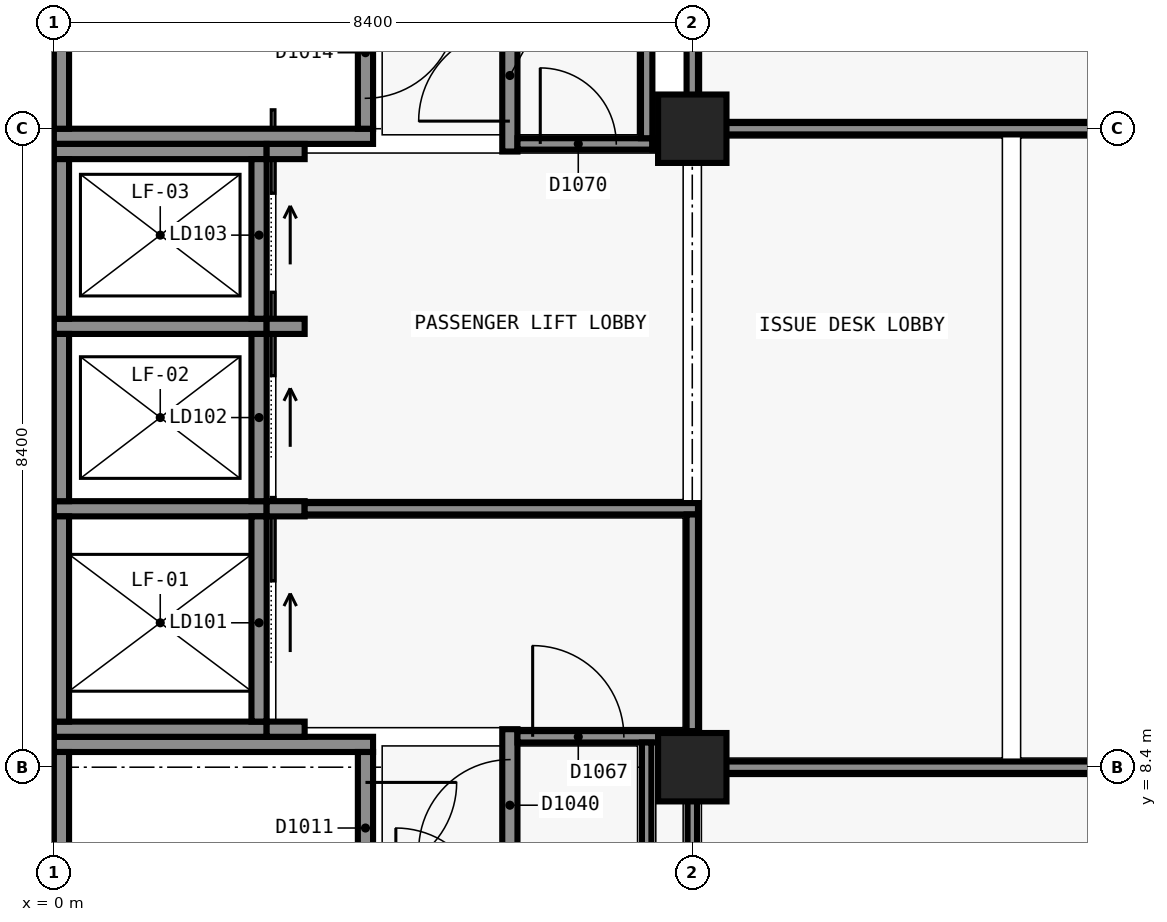
"""IFC4 building model, lengths in metres.
Left out: names, types, materials, properties, quantities, classifications, styles, units other than length and angle.
Written with IfcOpenShell. Run it as: python <this file> out.ifc"""

import sys

from ifc_helpers import new_model, si_unit, direction, frame, frame_2d, origin, origin_2d, place, context, subcontext, project, spatial, rectangle, extrude, element, fill, save


model = new_model("IFC4")
c1 = context("Model", 3, precision=1e-05, world=origin(), true_north=direction((0.0, 1.0)))
c2 = subcontext(c1, "Body", "Model", "MODEL_VIEW")
j1 = project(units=[si_unit("LENGTHUNIT", "METRE"), si_unit("PLANEANGLEUNIT", "RADIAN")], contexts=[c1])
p1 = place(None, origin())
s1 = spatial("IfcSite", under=j1, at=p1, CompositionType="ELEMENT")
p2 = place(p1, origin())
s2 = spatial("IfcBuilding", under=s1, at=p2, CompositionType="ELEMENT")
p3 = place(p2, frame((0.0, 0.0, 5.4)))
s3 = spatial("IfcBuildingStorey", under=s2, at=p3, CompositionType="ELEMENT", Elevation=5.4)
p4 = place(p3, frame((0.0, 8.7, 0.0), z_axis=(0.0, 0.0, 1.0), x_axis=(1.0, 0.0, 0.0)))
e1 = element("IfcWall", 1, at=p4, inside=s3, PredefinedType="SHEAR", context=c2, shape_type="SweptSolid", body=[
    extrude(rectangle(XDim=4.199, YDim=0.2, at=frame_2d((2.1, 0.0))), origin(), (0.0, 0.0, 1.0), 4.8),
])
p5 = place(p3, frame((0.1, 0.2, 0.0), z_axis=(0.0, 0.0, 1.0), x_axis=(0.0, 1.0, 0.0)))
e2 = element("IfcWall", 2, at=p5, inside=s3, PredefinedType="SHEAR", context=c2, shape_type="SweptSolid", body=[
    extrude(rectangle(XDim=8.4, YDim=0.2, at=frame_2d((4.2, 0.0))), origin(), (0.0, 0.0, 1.0), 4.8),
])
p6 = place(p3, frame((4.1, 8.6, 0.0), z_axis=(0.0, 0.0, 1.0), x_axis=(0.0, -1.0, 0.0)))
e3 = element("IfcWall", 3, at=p6, inside=s3, PredefinedType="SHEAR", context=c2, shape_type="SweptSolid", body=[
    extrude(rectangle(XDim=8.4, YDim=0.2, at=frame_2d((4.2, 0.0))), origin(), (0.0, 0.0, 1.0), 4.8),
])
p7 = place(p6, frame((0.4, 0.0, 0.0)))
e4 = element("IfcOpeningElement", 4, at=p7, cuts=e3, PredefinedType="OPENING", context=c2, shape_type="SweptSolid", body=[
    extrude(rectangle(XDim=1.2, YDim=2.1, at=frame_2d((0.6, 1.05))), frame((0.0, 0.11, 0.0), z_axis=(0.0, -1.0, 0.0), x_axis=(1.0, 0.0, 0.0)), (0.0, 0.0, 1.0), 0.22),
])
p8 = place(p3, frame((4.2, 16.7, 0.0), z_axis=(0.0, 0.0, 1.0), x_axis=(-1.0, 0.0, 0.0)))
e5 = element("IfcWall", 5, at=p8, inside=s3, PredefinedType="SHEAR", context=c2, shape_type="SweptSolid", body=[
    extrude(rectangle(XDim=4.199, YDim=0.2, at=frame_2d((2.1, 0.0))), origin(), (0.0, 0.0, 1.0), 4.8),
])
p9 = place(p3, frame((0.1, 16.8, 0.0), z_axis=(0.0, 0.0, 1.0), x_axis=(0.0, 1.0, 0.0)))
e6 = element("IfcWall", 6, at=p9, inside=s3, PredefinedType="SHEAR", context=c2, shape_type="SweptSolid", body=[
    extrude(rectangle(XDim=8.2, YDim=0.2, at=frame_2d((4.1, 0.0))), origin(), (0.0, 0.0, 1.0), 4.8),
])
p10 = place(p3, frame((4.1, 25.0, 0.0), z_axis=(0.0, 0.0, 1.0), x_axis=(0.0, -1.0, 0.0)))
e7 = element("IfcWall", 7, at=p10, inside=s3, PredefinedType="SHEAR", context=c2, shape_type="SweptSolid", body=[
    extrude(rectangle(XDim=8.2, YDim=0.2, at=frame_2d((4.1, 0.0))), origin(), (0.0, 0.0, 1.0), 4.8),
])
p11 = place(p10, frame((6.6, 0.0, 0.0)))
e8 = element("IfcOpeningElement", 8, at=p11, cuts=e7, PredefinedType="OPENING", context=c2, shape_type="SweptSolid", body=[
    extrude(rectangle(XDim=1.2, YDim=2.1, at=frame_2d((0.6, 1.05))), frame((0.0, 0.11, 0.0), z_axis=(0.0, -1.0, 0.0), x_axis=(1.0, 0.0, 0.0)), (0.0, 0.0, 1.0), 0.22),
])
for number, where, z_axis, x_axis in (
    (9, (2.8, 8.9, 0.0), (0.0, 0.0, 1.0), (-1.0, 0.0, 0.0)),
    (10, (0.0, 11.8, 0.0), (0.0, 0.0, 1.0), (1.0, 0.0, 0.0)),
):
    element("IfcWall", number, at=place(p3, frame(where, z_axis=z_axis, x_axis=x_axis)), inside=s3, PredefinedType="SHEAR", context=c2, shape_type="SweptSolid", body=[
        extrude(rectangle(XDim=2.8, YDim=0.2, at=frame_2d((1.4, 0.0))), origin(), (0.0, 0.0, 1.0), 4.8),
    ])
p12 = place(p3, frame((0.1, 9.0, 0.0), z_axis=(0.0, 0.0, 1.0), x_axis=(0.0, 1.0, 0.0)))
e11 = element("IfcWall", 11, at=p12, inside=s3, PredefinedType="SHEAR", context=c2, shape_type="SweptSolid", body=[
    extrude(rectangle(XDim=2.7, YDim=0.2, at=frame_2d((1.35, 0.0))), origin(), (0.0, 0.0, 1.0), 4.8),
])
p13 = place(p3, frame((2.7, 11.7, 0.0), z_axis=(0.0, 0.0, 1.0), x_axis=(0.0, -1.0, 0.0)))
e12 = element("IfcWall", 12, at=p13, inside=s3, PredefinedType="SHEAR", context=c2, shape_type="SweptSolid", body=[
    extrude(rectangle(XDim=2.7, YDim=0.2, at=frame_2d((1.35, 0.0))), origin(), (0.0, 0.0, 1.0), 4.8),
])
p14 = place(p13, frame((0.85, 0.0, 0.0)))
e13 = element("IfcOpeningElement", 13, at=p14, cuts=e12, PredefinedType="OPENING", context=c2, shape_type="SweptSolid", body=[
    extrude(rectangle(XDim=1.1, YDim=2.1, at=frame_2d((0.55, 1.05))), frame((0.0, 0.11, 0.0), z_axis=(0.0, -1.0, 0.0), x_axis=(1.0, 0.0, 0.0)), (0.0, 0.0, 1.0), 0.22),
])
p15 = place(p3, frame((0.0, 14.2, 0.0), z_axis=(0.0, 0.0, 1.0), x_axis=(1.0, 0.0, 0.0)))
e14 = element("IfcWall", 14, at=p15, inside=s3, PredefinedType="SHEAR", context=c2, shape_type="SweptSolid", body=[
    extrude(rectangle(XDim=2.8, YDim=0.2, at=frame_2d((1.4, 0.0))), origin(), (0.0, 0.0, 1.0), 4.8),
])
p16 = place(p3, frame((0.1, 11.9, 0.0), z_axis=(0.0, 0.0, 1.0), x_axis=(0.0, 1.0, 0.0)))
e15 = element("IfcWall", 15, at=p16, inside=s3, PredefinedType="SHEAR", context=c2, shape_type="SweptSolid", body=[
    extrude(rectangle(XDim=2.2, YDim=0.2, at=frame_2d((1.1, 0.0))), origin(), (0.0, 0.0, 1.0), 4.8),
])
p17 = place(p3, frame((2.7, 14.1, 0.0), z_axis=(0.0, 0.0, 1.0), x_axis=(0.0, -1.0, 0.0)))
e16 = element("IfcWall", 16, at=p17, inside=s3, PredefinedType="SHEAR", context=c2, shape_type="SweptSolid", body=[
    extrude(rectangle(XDim=2.2, YDim=0.2, at=frame_2d((1.1, 0.0))), origin(), (0.0, 0.0, 1.0), 4.8),
])
p18 = place(p17, frame((0.55, 0.0, 0.0)))
e17 = element("IfcOpeningElement", 17, at=p18, cuts=e16, PredefinedType="OPENING", context=c2, shape_type="SweptSolid", body=[
    extrude(rectangle(XDim=1.1, YDim=2.1, at=frame_2d((0.55, 1.05))), frame((0.0, 0.11, 0.0), z_axis=(0.0, -1.0, 0.0), x_axis=(1.0, 0.0, 0.0)), (0.0, 0.0, 1.0), 0.22),
])
p19 = place(p3, frame((0.0, 16.5, 0.0), z_axis=(0.0, 0.0, 1.0), x_axis=(1.0, 0.0, 0.0)))
e18 = element("IfcWall", 18, at=p19, inside=s3, PredefinedType="SHEAR", context=c2, shape_type="SweptSolid", body=[
    extrude(rectangle(XDim=2.8, YDim=0.2, at=frame_2d((1.4, 0.0))), origin(), (0.0, 0.0, 1.0), 4.8),
])
p20 = place(p3, frame((0.1, 14.3, 0.0), z_axis=(0.0, 0.0, 1.0), x_axis=(0.0, 1.0, 0.0)))
e19 = element("IfcWall", 19, at=p20, inside=s3, PredefinedType="SHEAR", context=c2, shape_type="SweptSolid", body=[
    extrude(rectangle(XDim=2.1, YDim=0.2, at=frame_2d((1.05, 0.0))), origin(), (0.0, 0.0, 1.0), 4.8),
])
p21 = place(p3, frame((2.7, 16.4, 0.0), z_axis=(0.0, 0.0, 1.0), x_axis=(0.0, -1.0, 0.0)))
e20 = element("IfcWall", 20, at=p21, inside=s3, PredefinedType="SHEAR", context=c2, shape_type="SweptSolid", body=[
    extrude(rectangle(XDim=2.1, YDim=0.2, at=frame_2d((1.05, 0.0))), origin(), (0.0, 0.0, 1.0), 4.8),
])
p22 = place(p21, frame((0.45, 0.0, 0.0)))
e21 = element("IfcOpeningElement", 21, at=p22, cuts=e20, PredefinedType="OPENING", context=c2, shape_type="SweptSolid", body=[
    extrude(rectangle(XDim=1.1, YDim=2.1, at=frame_2d((0.55, 1.05))), frame((0.0, 0.11, 0.0), z_axis=(0.0, -1.0, 0.0), x_axis=(1.0, 0.0, 0.0)), (0.0, 0.0, 1.0), 0.22),
])
for number, where, z_axis, x_axis in (
    (22, (8.4, 8.4, 0.0), (0.0, 0.0, 1.0), (1.0, 0.0, 0.0)),
    (23, (8.4, 16.8, 0.0), (0.0, 0.0, 1.0), (1.0, 0.0, 0.0)),
):
    element("IfcColumn", number, at=place(p3, frame(where, z_axis=z_axis, x_axis=x_axis)), inside=s3, PredefinedType="COLUMN", context=c2, shape_type="SweptSolid", body=[
        extrude(rectangle(XDim=0.9, YDim=0.9, at=origin_2d()), origin(), (0.0, 0.0, 1.0), 4.8),
    ])
for number, where, z_axis, x_axis in (
    (24, (3.3, 8.9, 0.0), (0.0, 0.0, 1.0), (-1.0, 0.0, 0.0)),
    (25, (2.8, 11.8, 0.0), (0.0, 0.0, 1.0), (1.0, 0.0, 0.0)),
    (26, (2.8, 14.2, 0.0), (0.0, 0.0, 1.0), (1.0, 0.0, 0.0)),
    (27, (2.8, 16.5, 0.0), (0.0, 0.0, 1.0), (1.0, 0.0, 0.0)),
):
    element("IfcWall", number, at=place(p3, frame(where, z_axis=z_axis, x_axis=x_axis)), inside=s3, PredefinedType="SHEAR", context=c2, shape_type="SweptSolid", body=[
        extrude(rectangle(XDim=0.5, YDim=0.2, at=frame_2d((0.25, 0.0))), origin(), (0.0, 0.0, 1.0), 4.8),
    ])
p23 = place(p3, frame((6.0, 6.5, 0.0), z_axis=(0.0, 0.0, 1.0), x_axis=(0.0, 1.0, 0.0)))
e28 = element("IfcWall", 28, at=p23, inside=s3, PredefinedType="SOLIDWALL", context=c2, shape_type="SweptSolid", body=[
    extrude(rectangle(XDim=2.4, YDim=0.2, at=frame_2d((1.2, 0.0))), origin(), (0.0, 0.0, 1.0), 4.0),
])
p24 = place(p23, frame((0.8, 0.0, 0.0)))
e29 = element("IfcOpeningElement", 29, at=p24, cuts=e28, PredefinedType="OPENING", context=c2, shape_type="SweptSolid", body=[
    extrude(rectangle(XDim=1.2, YDim=2.1, at=frame_2d((0.6, 1.05))), frame((0.0, 0.11, 0.0), z_axis=(0.0, -1.0, 0.0), x_axis=(1.0, 0.0, 0.0)), (0.0, 0.0, 1.0), 0.22),
])
p25 = place(p3, frame((6.0, 16.5, 0.0), z_axis=(0.0, 0.0, 1.0), x_axis=(0.0, 1.0, 0.0)))
e30 = element("IfcWall", 30, at=p25, inside=s3, PredefinedType="SOLIDWALL", context=c2, shape_type="SweptSolid", body=[
    extrude(rectangle(XDim=2.4, YDim=0.2, at=frame_2d((1.2, 0.0))), origin(), (0.0, 0.0, 1.0), 4.0),
])
p26 = place(p25, frame((0.4, 0.0, 0.0)))
e31 = element("IfcOpeningElement", 31, at=p26, cuts=e30, PredefinedType="OPENING", context=c2, shape_type="SweptSolid", body=[
    extrude(rectangle(XDim=1.2, YDim=2.1, at=frame_2d((0.6, 1.05))), frame((0.0, 0.11, 0.0), z_axis=(0.0, -1.0, 0.0), x_axis=(1.0, 0.0, 0.0)), (0.0, 0.0, 1.0), 0.22),
])
p27 = place(p3, frame((8.325, 8.4, 0.0), z_axis=(0.0, 0.0, 1.0), x_axis=(1.0, 0.0, 0.0)))
e32 = element("IfcWall", 32, at=p27, inside=s3, PredefinedType="PARTITIONING", context=c2, shape_type="SweptSolid", body=[
    extrude(rectangle(XDim=19.175, YDim=0.15, at=frame_2d((9.587, 0.0))), origin(), (0.0, 0.0, 1.0), 3.8),
])
p28 = place(p3, frame((6.1, 16.6, 0.0), z_axis=(0.0, 0.0, 1.0), x_axis=(1.0, 0.0, 0.0)))
e33 = element("IfcWall", 33, at=p28, inside=s3, PredefinedType="PARTITIONING", context=c2, shape_type="SweptSolid", body=[
    extrude(rectangle(XDim=1.775, YDim=0.15, at=frame_2d((0.887, 0.0))), origin(), (0.0, 0.0, 1.0), 4.0),
])
p29 = place(p28, frame((0.3, 0.0, 0.0)))
e34 = element("IfcOpeningElement", 34, at=p29, cuts=e33, PredefinedType="OPENING", context=c2, shape_type="SweptSolid", body=[
    extrude(rectangle(XDim=1.0, YDim=2.1, at=frame_2d((0.5, 1.05))), frame((0.0, 0.085, 0.0), z_axis=(0.0, -1.0, 0.0), x_axis=(1.0, 0.0, 0.0)), (0.0, 0.0, 1.0), 0.17),
])
p30 = place(p3, frame((8.325, 16.8, 0.0), z_axis=(0.0, 0.0, 1.0), x_axis=(1.0, 0.0, 0.0)))
e35 = element("IfcWall", 35, at=p30, inside=s3, PredefinedType="PARTITIONING", context=c2, shape_type="SweptSolid", body=[
    extrude(rectangle(XDim=25.15, YDim=0.15, at=frame_2d((12.575, 0.0))), origin(), (0.0, 0.0, 1.0), 3.8),
])
p31 = place(p30, frame((20.575, 0.0, 0.0)))
e36 = element("IfcOpeningElement", 36, at=p31, cuts=e35, PredefinedType="OPENING", context=c2, shape_type="SweptSolid", body=[
    extrude(rectangle(XDim=1.0, YDim=2.1, at=frame_2d((0.5, 1.05))), frame((0.0, 0.085, 0.0), z_axis=(0.0, -1.0, 0.0), x_axis=(1.0, 0.0, 0.0)), (0.0, 0.0, 1.0), 0.17),
])
p32 = place(p30, frame((5.875, 0.0, 0.0)))
e37 = element("IfcOpeningElement", 37, at=p32, cuts=e35, PredefinedType="OPENING", context=c2, shape_type="SweptSolid", body=[
    extrude(rectangle(XDim=1.0, YDim=2.1, at=frame_2d((0.5, 1.05))), frame((0.0, 0.085, 0.0), z_axis=(0.0, -1.0, 0.0), x_axis=(1.0, 0.0, 0.0)), (0.0, 0.0, 1.0), 0.17),
])
p33 = place(p30, frame((12.175, 0.0, 0.0)))
e38 = element("IfcOpeningElement", 38, at=p33, cuts=e35, PredefinedType="OPENING", context=c2, shape_type="SweptSolid", body=[
    extrude(rectangle(XDim=1.0, YDim=2.1, at=frame_2d((0.5, 1.05))), frame((0.0, 0.085, 0.0), z_axis=(0.0, -1.0, 0.0), x_axis=(1.0, 0.0, 0.0)), (0.0, 0.0, 1.0), 0.17),
])
p34 = place(p3, frame((6.1, 8.8, 0.0), z_axis=(0.0, 0.0, 1.0), x_axis=(1.0, 0.0, 0.0)))
e39 = element("IfcWall", 39, at=p34, inside=s3, PredefinedType="SOLIDWALL", context=c2, shape_type="SweptSolid", body=[
    extrude(rectangle(XDim=2.375, YDim=0.15, at=frame_2d((1.188, 0.0))), origin(), (0.0, 0.0, 1.0), 3.8),
])
p35 = place(p34, frame((0.2, 0.0, 0.0)))
e40 = element("IfcOpeningElement", 40, at=p35, cuts=e39, PredefinedType="OPENING", context=c2, shape_type="SweptSolid", body=[
    extrude(rectangle(XDim=1.2, YDim=2.1, at=frame_2d((0.6, 1.05))), frame((0.0, 0.085, 0.0), z_axis=(0.0, -1.0, 0.0), x_axis=(1.0, 0.0, 0.0)), (0.0, 0.0, 1.0), 0.17),
])
p36 = place(p3, frame((3.3, 11.8, 0.0), z_axis=(0.0, 0.0, 1.0), x_axis=(1.0, 0.0, 0.0)))
e41 = element("IfcWall", 41, at=p36, inside=s3, PredefinedType="SOLIDWALL", context=c2, shape_type="SweptSolid", body=[
    extrude(rectangle(XDim=5.175, YDim=0.15, at=frame_2d((2.587, 0.0))), origin(), (0.0, 0.0, 1.0), 3.8),
])
p37 = place(p3, frame((7.875, 16.6, 0.0), z_axis=(0.0, 0.0, 1.0), x_axis=(1.0, 0.0, 0.0)))
e42 = element("IfcWall", 42, at=p37, inside=s3, PredefinedType="SOLIDWALL", context=c2, shape_type="SweptSolid", body=[
    extrude(rectangle(XDim=0.6, YDim=0.15, at=frame_2d((0.3, 0.0))), origin(), (0.0, 0.0, 1.0), 3.8),
])
p38 = place(p3, frame((8.4, 8.475, 0.0), z_axis=(0.0, 0.0, 1.0), x_axis=(0.0, 1.0, 0.0)))
e43 = element("IfcWall", 43, at=p38, inside=s3, PredefinedType="PARTITIONING", context=c2, shape_type="SweptSolid", body=[
    extrude(rectangle(XDim=0.25, YDim=0.15, at=frame_2d((0.125, 0.0))), origin(), (0.0, 0.0, 1.0), 3.8),
])
p39 = place(p3, frame((8.4, 8.875, 0.0), z_axis=(0.0, 0.0, 1.0), x_axis=(0.0, 1.0, 0.0)))
e44 = element("IfcWall", 44, at=p39, inside=s3, PredefinedType="SOLIDWALL", context=c2, shape_type="SweptSolid", body=[
    extrude(rectangle(XDim=2.85, YDim=0.15, at=frame_2d((1.425, 0.0))), origin(), (0.0, 0.0, 1.0), 3.8),
])
p40 = place(p3, frame((7.8, 16.675, 0.0), z_axis=(0.0, 0.0, 1.0), x_axis=(0.0, 1.0, 0.0)))
e45 = element("IfcWall", 45, at=p40, inside=s3, PredefinedType="SOLIDWALL", context=c2, shape_type="SweptSolid", body=[
    extrude(rectangle(XDim=1.65, YDim=0.15, at=frame_2d((0.825, 0.0))), origin(), (0.0, 0.0, 1.0), 4.0),
])
p41 = place(p3, frame((8.4, 16.875, 0.0), z_axis=(0.0, 0.0, 1.0), x_axis=(0.0, 1.0, 0.0)))
e46 = element("IfcWall", 46, at=p41, inside=s3, PredefinedType="SOLIDWALL", context=c2, shape_type="SweptSolid", body=[
    extrude(rectangle(XDim=7.575, YDim=0.15, at=frame_2d((3.788, 0.0))), origin(), (0.0, 0.0, 1.0), 3.8),
])
p42 = place(p3, frame((7.8, 7.062, 0.0), z_axis=(0.0, 0.0, 1.0), x_axis=(0.0, 1.0, 0.0)))
e47 = element("IfcWall", 47, at=p42, inside=s3, PredefinedType="PARTITIONING", context=c2, shape_type="SweptSolid", body=[
    extrude(rectangle(XDim=1.663, YDim=0.125, at=frame_2d((0.831, 0.0))), origin(), (0.0, 0.0, 1.0), 4.0),
])
p43 = place(p3, frame((8.4, 0.75, 0.0), z_axis=(0.0, 0.0, 1.0), x_axis=(0.0, 1.0, 0.0)))
e48 = element("IfcWall", 48, at=p43, inside=s3, PredefinedType="PARTITIONING", context=c2, shape_type="SweptSolid", body=[
    extrude(rectangle(XDim=7.575, YDim=0.125, at=frame_2d((3.788, 0.0))), origin(), (0.0, 0.0, 1.0), 3.8),
])
p44 = place(p14, origin())
e49 = element("IfcDoor", 49, at=p44, inside=s3, OperationType="SLIDING_TO_LEFT", PredefinedType="DOOR", context=c2, shape_type="SweptSolid", body=[
    extrude(rectangle(XDim=1.1, YDim=2.1, at=frame_2d((0.55, 1.05))), frame((0.0, 0.025, 0.0), z_axis=(0.0, -1.0, 0.0), x_axis=(1.0, 0.0, 0.0)), (0.0, 0.0, 1.0), 0.05),
])
fill(e13, e49)
p45 = place(p18, origin())
e50 = element("IfcDoor", 50, at=p45, inside=s3, OperationType="SLIDING_TO_LEFT", PredefinedType="DOOR", context=c2, shape_type="SweptSolid", body=[
    extrude(rectangle(XDim=1.1, YDim=2.1, at=frame_2d((0.55, 1.05))), frame((0.0, 0.025, 0.0), z_axis=(0.0, -1.0, 0.0), x_axis=(1.0, 0.0, 0.0)), (0.0, 0.0, 1.0), 0.05),
])
fill(e17, e50)
p46 = place(p22, origin())
e51 = element("IfcDoor", 51, at=p46, inside=s3, OperationType="SLIDING_TO_LEFT", PredefinedType="DOOR", context=c2, shape_type="SweptSolid", body=[
    extrude(rectangle(XDim=1.1, YDim=2.1, at=frame_2d((0.55, 1.05))), frame((0.0, 0.025, 0.0), z_axis=(0.0, -1.0, 0.0), x_axis=(1.0, 0.0, 0.0)), (0.0, 0.0, 1.0), 0.05),
])
fill(e21, e51)
p47 = place(p7, origin())
e52 = element("IfcDoor", 52, at=p47, inside=s3, OperationType="SINGLE_SWING_RIGHT", PredefinedType="DOOR", context=c2, shape_type="SweptSolid", body=[
    extrude(rectangle(XDim=1.2, YDim=2.1, at=frame_2d((0.6, 1.05))), frame((0.0, 0.025, 0.0), z_axis=(0.0, -1.0, 0.0), x_axis=(1.0, 0.0, 0.0)), (0.0, 0.0, 1.0), 0.05),
])
fill(e4, e52)
p48 = place(p11, origin())
e53 = element("IfcDoor", 53, at=p48, inside=s3, OperationType="SINGLE_SWING_RIGHT", PredefinedType="DOOR", context=c2, shape_type="SweptSolid", body=[
    extrude(rectangle(XDim=1.2, YDim=2.1, at=frame_2d((0.6, 1.05))), frame((0.0, 0.025, 0.0), z_axis=(0.0, -1.0, 0.0), x_axis=(1.0, 0.0, 0.0)), (0.0, 0.0, 1.0), 0.05),
])
fill(e8, e53)
p49 = place(p24, origin())
e54 = element("IfcDoor", 54, at=p49, inside=s3, OperationType="SINGLE_SWING_RIGHT", PredefinedType="DOOR", context=c2, shape_type="SweptSolid", body=[
    extrude(rectangle(XDim=1.2, YDim=2.1, at=frame_2d((0.6, 1.05))), frame((0.0, 0.025, 0.0), z_axis=(0.0, -1.0, 0.0), x_axis=(1.0, 0.0, 0.0)), (0.0, 0.0, 1.0), 0.05),
])
fill(e29, e54)
p50 = place(p26, origin())
e55 = element("IfcDoor", 55, at=p50, inside=s3, OperationType="SINGLE_SWING_RIGHT", PredefinedType="DOOR", context=c2, shape_type="SweptSolid", body=[
    extrude(rectangle(XDim=1.2, YDim=2.1, at=frame_2d((0.6, 1.05))), frame((0.0, 0.025, 0.0), z_axis=(0.0, -1.0, 0.0), x_axis=(1.0, 0.0, 0.0)), (0.0, 0.0, 1.0), 0.05),
])
fill(e31, e55)
p51 = place(p35, origin())
e56 = element("IfcDoor", 56, at=p51, inside=s3, OperationType="SINGLE_SWING_RIGHT", PredefinedType="DOOR", context=c2, shape_type="SweptSolid", body=[
    extrude(rectangle(XDim=1.2, YDim=2.1, at=frame_2d((0.6, 1.05))), frame((0.0, 0.025, 0.0), z_axis=(0.0, -1.0, 0.0), x_axis=(1.0, 0.0, 0.0)), (0.0, 0.0, 1.0), 0.05),
])
fill(e40, e56)
p52 = place(p29, origin())
e57 = element("IfcDoor", 57, at=p52, inside=s3, OperationType="SINGLE_SWING_RIGHT", PredefinedType="DOOR", context=c2, shape_type="SweptSolid", body=[
    extrude(rectangle(XDim=1.0, YDim=2.1, at=frame_2d((0.5, 1.05))), frame((0.0, 0.025, 0.0), z_axis=(0.0, -1.0, 0.0), x_axis=(1.0, 0.0, 0.0)), (0.0, 0.0, 1.0), 0.05),
])
fill(e34, e57)
save(model, sys.argv[1])
